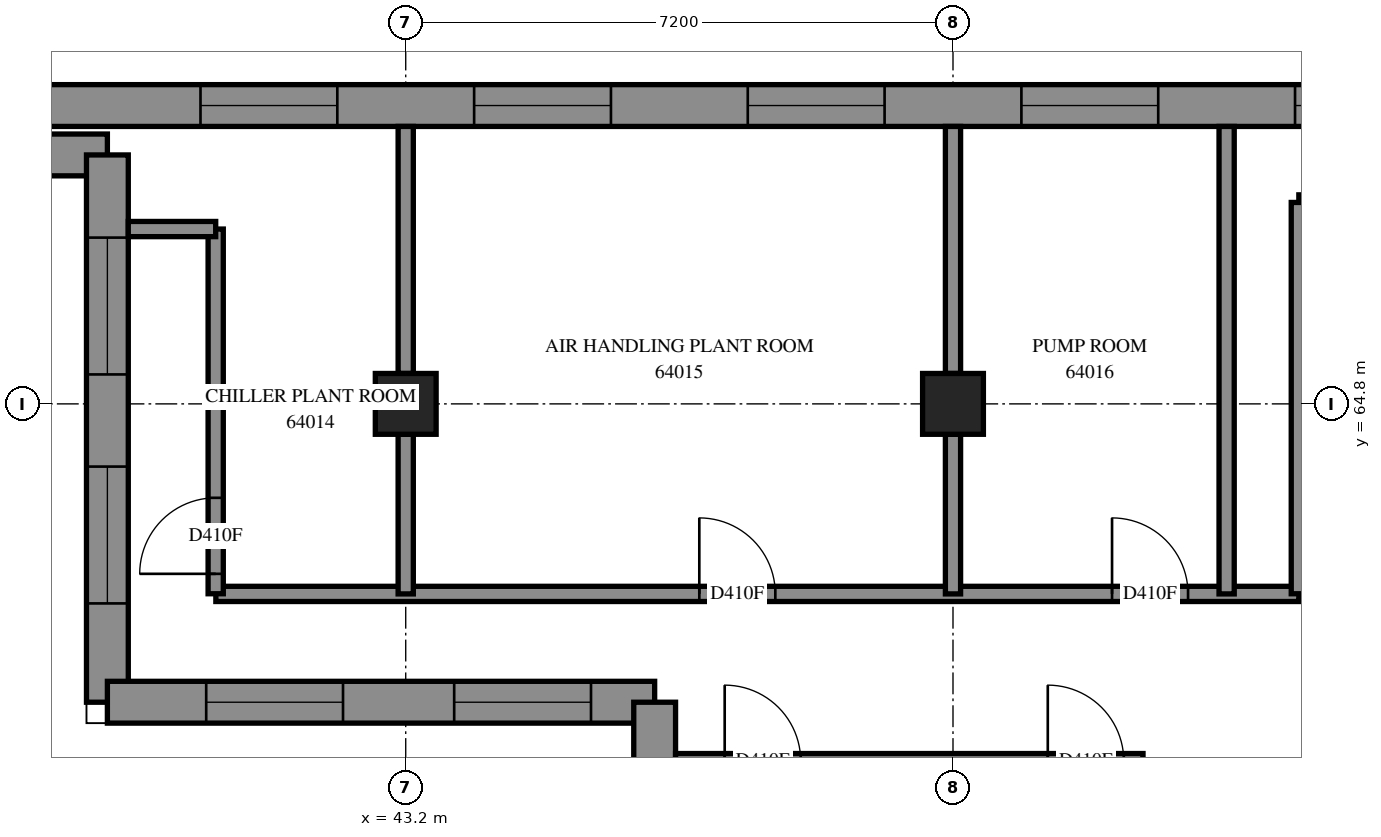
"""IFC4 building model, lengths in metres.
Left out: names, types, materials, properties, quantities, classifications, styles, units other than length and angle.
Written with IfcOpenShell. Run it as: python <this file> out.ifc"""

import sys

from ifc_helpers import new_model, si_unit, direction, frame, frame_2d, origin, origin_2d, place, context, subcontext, project, spatial, polyline, rectangle, outline, extrude, element, fill, save


model = new_model("IFC4")
c1 = context("Model", 3, precision=1e-05, world=origin(), true_north=direction((0.0, 1.0)))
c2 = subcontext(c1, "Body", "Model", "MODEL_VIEW")
j1 = project(units=[si_unit("LENGTHUNIT", "METRE"), si_unit("PLANEANGLEUNIT", "RADIAN")], contexts=[c1])
p1 = place(None, origin())
s1 = spatial("IfcSite", under=j1, at=p1, CompositionType="ELEMENT")
p2 = place(p1, origin())
s2 = spatial("IfcBuilding", under=s1, at=p2, CompositionType="ELEMENT")
p3 = place(p2, frame((0.0, 0.0, 234.6)))
s3 = spatial("IfcBuildingStorey", under=s2, at=p3, CompositionType="ELEMENT", Elevation=234.6)
for number, where, z_axis, x_axis in (
    (1, (43.2, 64.8, 0.0), (0.0, 0.0, 1.0), (1.0, 0.0, 0.0)),
    (2, (50.4, 64.8, 0.0), (0.0, 0.0, 1.0), (1.0, 0.0, 0.0)),
):
    element("IfcColumn", number, at=place(p3, frame(where, z_axis=z_axis, x_axis=x_axis)), inside=s3, PredefinedType="COLUMN", context=c2, shape_type="SweptSolid", body=[
        extrude(rectangle(XDim=0.8, YDim=0.8, at=origin_2d()), origin(), (0.0, 0.0, 1.0), 4.7),
    ])
p4 = place(p3, frame((77.844, 68.725, 0.0), z_axis=(0.0, 0.0, 1.0), x_axis=(-1.0, 0.0, 0.0)))
e3 = element("IfcWall", 3, at=p4, inside=s3, PredefinedType="SOLIDWALL", context=c2, shape_type="SweptSolid", body=[
    extrude(outline(polyline([(-0.114, -0.275), (46.044, -0.275), (45.493, 0.275), (0.114, 0.275), (-0.114, -0.275)])), origin(), (0.0, 0.0, 1.0), 4.7),
])
p5 = place(p4, frame((3.193, 0.0, 0.9)))
e4 = element("IfcOpeningElement", 4, at=p5, cuts=e3, PredefinedType="OPENING", context=c2, shape_type="SweptSolid", body=[
    extrude(rectangle(XDim=1.8, YDim=3.6, at=frame_2d((0.9, 1.8))), frame((0.0, 0.285, 0.0), z_axis=(0.0, -1.0, 0.0), x_axis=(1.0, 0.0, 0.0)), (0.0, 0.0, 1.0), 0.57),
])
p6 = place(p4, frame((6.744, 0.0, 0.9)))
e5 = element("IfcOpeningElement", 5, at=p6, cuts=e3, PredefinedType="OPENING", context=c2, shape_type="SweptSolid", body=[
    extrude(rectangle(XDim=1.8, YDim=3.6, at=frame_2d((0.9, 1.8))), frame((0.0, 0.285, 0.0), z_axis=(0.0, -1.0, 0.0), x_axis=(1.0, 0.0, 0.0)), (0.0, 0.0, 1.0), 0.57),
])
p7 = place(p4, frame((10.344, 0.0, 0.9)))
e6 = element("IfcOpeningElement", 6, at=p7, cuts=e3, PredefinedType="OPENING", context=c2, shape_type="SweptSolid", body=[
    extrude(rectangle(XDim=1.8, YDim=3.6, at=frame_2d((0.9, 1.8))), frame((0.0, 0.285, 0.0), z_axis=(0.0, -1.0, 0.0), x_axis=(1.0, 0.0, 0.0)), (0.0, 0.0, 1.0), 0.57),
])
p8 = place(p4, frame((13.944, 0.0, 0.9)))
e7 = element("IfcOpeningElement", 7, at=p8, cuts=e3, PredefinedType="OPENING", context=c2, shape_type="SweptSolid", body=[
    extrude(rectangle(XDim=1.8, YDim=3.6, at=frame_2d((0.9, 1.8))), frame((0.0, 0.285, 0.0), z_axis=(0.0, -1.0, 0.0), x_axis=(1.0, 0.0, 0.0)), (0.0, 0.0, 1.0), 0.57),
])
p9 = place(p4, frame((17.544, 0.0, 0.9)))
e8 = element("IfcOpeningElement", 8, at=p9, cuts=e3, PredefinedType="OPENING", context=c2, shape_type="SweptSolid", body=[
    extrude(rectangle(XDim=1.8, YDim=3.6, at=frame_2d((0.9, 1.8))), frame((0.0, 0.285, 0.0), z_axis=(0.0, -1.0, 0.0), x_axis=(1.0, 0.0, 0.0)), (0.0, 0.0, 1.0), 0.57),
])
p10 = place(p4, frame((21.143, 0.0, 0.9)))
e9 = element("IfcOpeningElement", 9, at=p10, cuts=e3, PredefinedType="OPENING", context=c2, shape_type="SweptSolid", body=[
    extrude(rectangle(XDim=1.8, YDim=3.6, at=frame_2d((0.9, 1.8))), frame((0.0, 0.285, 0.0), z_axis=(0.0, -1.0, 0.0), x_axis=(1.0, 0.0, 0.0)), (0.0, 0.0, 1.0), 0.57),
])
p11 = place(p4, frame((24.744, 0.0, 0.9)))
e10 = element("IfcOpeningElement", 10, at=p11, cuts=e3, PredefinedType="OPENING", context=c2, shape_type="SweptSolid", body=[
    extrude(rectangle(XDim=1.8, YDim=3.6, at=frame_2d((0.9, 1.8))), frame((0.0, 0.285, 0.0), z_axis=(0.0, -1.0, 0.0), x_axis=(1.0, 0.0, 0.0)), (0.0, 0.0, 1.0), 0.57),
])
p12 = place(p4, frame((28.343, 0.0, 0.9)))
e11 = element("IfcOpeningElement", 11, at=p12, cuts=e3, PredefinedType="OPENING", context=c2, shape_type="SweptSolid", body=[
    extrude(rectangle(XDim=1.8, YDim=3.6, at=frame_2d((0.9, 1.8))), frame((0.0, 0.285, 0.0), z_axis=(0.0, -1.0, 0.0), x_axis=(1.0, 0.0, 0.0)), (0.0, 0.0, 1.0), 0.57),
])
p13 = place(p4, frame((31.944, 0.0, 0.9)))
e12 = element("IfcOpeningElement", 12, at=p13, cuts=e3, PredefinedType="OPENING", context=c2, shape_type="SweptSolid", body=[
    extrude(rectangle(XDim=1.8, YDim=3.6, at=frame_2d((0.9, 1.8))), frame((0.0, 0.285, 0.0), z_axis=(0.0, -1.0, 0.0), x_axis=(1.0, 0.0, 0.0)), (0.0, 0.0, 1.0), 0.57),
])
p14 = place(p4, frame((35.544, 0.0, 0.9)))
e13 = element("IfcOpeningElement", 13, at=p14, cuts=e3, PredefinedType="OPENING", context=c2, shape_type="SweptSolid", body=[
    extrude(rectangle(XDim=1.8, YDim=3.6, at=frame_2d((0.9, 1.8))), frame((0.0, 0.285, 0.0), z_axis=(0.0, -1.0, 0.0), x_axis=(1.0, 0.0, 0.0)), (0.0, 0.0, 1.0), 0.57),
])
p15 = place(p3, frame((32.075, 68.075, 0.0), z_axis=(0.0, 0.0, 1.0), x_axis=(1.0, 0.0, 0.0)))
e14 = element("IfcWall", 14, at=p15, inside=s3, PredefinedType="SOLIDWALL", context=c2, shape_type="SweptSolid", body=[
    extrude(outline(polyline([(-0.275, -0.275), (6.925, -0.275), (7.475, 0.275), (0.275, 0.275), (-0.275, -0.275)])), origin(), (0.0, 0.0, 1.0), 4.7),
])
p16 = place(p3, frame((39.275, 68.075, 0.0), z_axis=(0.0, 0.0, 1.0), x_axis=(0.0, -1.0, 0.0)))
e15 = element("IfcWall", 15, at=p16, inside=s3, PredefinedType="SOLIDWALL", context=c2, shape_type="SweptSolid", body=[
    extrude(outline(polyline([(0.275, -0.275), (7.475, -0.275), (6.925, 0.275), (-0.275, 0.275), (0.275, -0.275)])), origin(), (0.0, 0.0, 1.0), 4.7),
])
p17 = place(p16, frame((1.087, 0.0, 0.9)))
e16 = element("IfcOpeningElement", 16, at=p17, cuts=e15, PredefinedType="OPENING", context=c2, shape_type="SweptSolid", body=[
    extrude(rectangle(XDim=1.8, YDim=3.6, at=frame_2d((0.9, 1.8))), frame((0.0, 0.285, 0.0), z_axis=(0.0, -1.0, 0.0), x_axis=(1.0, 0.0, 0.0)), (0.0, 0.0, 1.0), 0.57),
])
p18 = place(p16, frame((4.1, 0.0, 0.9)))
e17 = element("IfcOpeningElement", 17, at=p18, cuts=e15, PredefinedType="OPENING", context=c2, shape_type="SweptSolid", body=[
    extrude(rectangle(XDim=1.8, YDim=3.6, at=frame_2d((0.9, 1.8))), frame((0.0, 0.285, 0.0), z_axis=(0.0, -1.0, 0.0), x_axis=(1.0, 0.0, 0.0)), (0.0, 0.0, 1.0), 0.57),
])
p19 = place(p3, frame((39.275, 60.875, 0.0), z_axis=(0.0, 0.0, 1.0), x_axis=(1.0, 0.0, 0.0)))
e18 = element("IfcWall", 18, at=p19, inside=s3, PredefinedType="SOLIDWALL", context=c2, shape_type="SweptSolid", body=[
    extrude(outline(polyline([(-0.275, -0.275), (6.925, -0.275), (7.475, 0.275), (0.275, 0.275), (-0.275, -0.275)])), origin(), (0.0, 0.0, 1.0), 4.7),
])
p20 = place(p19, frame((1.3, 0.0, 0.9)))
e19 = element("IfcOpeningElement", 19, at=p20, cuts=e18, PredefinedType="OPENING", context=c2, shape_type="SweptSolid", body=[
    extrude(rectangle(XDim=1.8, YDim=3.6, at=frame_2d((0.9, 1.8))), frame((0.0, 0.285, 0.0), z_axis=(0.0, -1.0, 0.0), x_axis=(1.0, 0.0, 0.0)), (0.0, 0.0, 1.0), 0.57),
])
p21 = place(p19, frame((4.562, 0.0, 0.9)))
e20 = element("IfcOpeningElement", 20, at=p21, cuts=e18, PredefinedType="OPENING", context=c2, shape_type="SweptSolid", body=[
    extrude(rectangle(XDim=1.8, YDim=3.6, at=frame_2d((0.9, 1.8))), frame((0.0, 0.285, 0.0), z_axis=(0.0, -1.0, 0.0), x_axis=(1.0, 0.0, 0.0)), (0.0, 0.0, 1.0), 0.57),
])
p22 = place(p3, frame((46.475, 60.875, 0.0), z_axis=(0.0, 0.0, 1.0), x_axis=(0.0, -1.0, 0.0)))
e21 = element("IfcWall", 21, at=p22, inside=s3, PredefinedType="SOLIDWALL", context=c2, shape_type="SweptSolid", body=[
    extrude(outline(polyline([(0.275, -0.275), (7.475, -0.275), (6.925, 0.275), (-0.275, 0.275), (0.275, -0.275)])), origin(), (0.0, 0.0, 1.0), 4.7),
])
p23 = place(p22, frame((0.887, 0.0, 0.9)))
e22 = element("IfcOpeningElement", 22, at=p23, cuts=e21, PredefinedType="OPENING", context=c2, shape_type="SweptSolid", body=[
    extrude(rectangle(XDim=1.8, YDim=3.6, at=frame_2d((0.9, 1.8))), frame((0.0, 0.285, 0.0), z_axis=(0.0, -1.0, 0.0), x_axis=(1.0, 0.0, 0.0)), (0.0, 0.0, 1.0), 0.57),
])
p24 = place(p22, frame((4.1, 0.0, 0.9)))
e23 = element("IfcOpeningElement", 23, at=p24, cuts=e21, PredefinedType="OPENING", context=c2, shape_type="SweptSolid", body=[
    extrude(rectangle(XDim=1.8, YDim=3.6, at=frame_2d((0.9, 1.8))), frame((0.0, 0.285, 0.0), z_axis=(0.0, -1.0, 0.0), x_axis=(1.0, 0.0, 0.0)), (0.0, 0.0, 1.0), 0.57),
])
p25 = place(p3, frame((54.95, 67.45, 0.0), z_axis=(0.0, 0.0, 1.0), x_axis=(1.0, 0.0, 0.0)))
e24 = element("IfcWall", 24, at=p25, inside=s3, PredefinedType="PARTITIONING", context=c2, shape_type="SweptSolid", body=[
    extrude(rectangle(XDim=19.7, YDim=0.2, at=frame_2d((9.85, 0.0))), origin(), (0.0, 0.0, 1.0), 4.7),
])
p26 = place(p3, frame((40.702, 62.3, 0.0), z_axis=(0.0, 0.0, 1.0), x_axis=(1.0, 0.0, 0.0)))
e25 = element("IfcWall", 25, at=p26, inside=s3, PredefinedType="PARTITIONING", context=c2, shape_type="SweptSolid", body=[
    extrude(rectangle(XDim=14.248, YDim=0.2, at=frame_2d((7.124, 0.0))), origin(), (0.0, 0.0, 1.0), 4.7),
])
p27 = place(p26, frame((6.361, 0.0, 0.0)))
e26 = element("IfcOpeningElement", 26, at=p27, cuts=e25, PredefinedType="OPENING", context=c2, shape_type="SweptSolid", body=[
    extrude(rectangle(XDim=1.0, YDim=2.1, at=frame_2d((0.5, 1.05))), frame((0.0, 0.11, 0.0), z_axis=(0.0, -1.0, 0.0), x_axis=(1.0, 0.0, 0.0)), (0.0, 0.0, 1.0), 0.22),
])
p28 = place(p26, frame((11.79, 0.0, 0.0)))
e27 = element("IfcOpeningElement", 27, at=p28, cuts=e25, PredefinedType="OPENING", context=c2, shape_type="SweptSolid", body=[
    extrude(rectangle(XDim=1.0, YDim=2.1, at=frame_2d((0.5, 1.05))), frame((0.0, 0.11, 0.0), z_axis=(0.0, -1.0, 0.0), x_axis=(1.0, 0.0, 0.0)), (0.0, 0.0, 1.0), 0.22),
])
p29 = place(p3, frame((46.75, 60.1, 0.0), z_axis=(0.0, 0.0, 1.0), x_axis=(1.0, 0.0, 0.0)))
e28 = element("IfcWall", 28, at=p29, inside=s3, PredefinedType="PARTITIONING", context=c2, shape_type="SweptSolid", body=[
    extrude(rectangle(XDim=6.15, YDim=0.2, at=frame_2d((3.075, 0.0))), origin(), (0.0, 0.0, 1.0), 4.7),
])
p30 = place(p29, frame((0.646, 0.0, 0.0)))
e29 = element("IfcOpeningElement", 29, at=p30, cuts=e28, PredefinedType="OPENING", context=c2, shape_type="SweptSolid", body=[
    extrude(rectangle(XDim=1.0, YDim=2.1, at=frame_2d((0.5, 1.05))), frame((0.0, 0.11, 0.0), z_axis=(0.0, -1.0, 0.0), x_axis=(1.0, 0.0, 0.0)), (0.0, 0.0, 1.0), 0.22),
])
p31 = place(p29, frame((4.897, 0.0, 0.0)))
e30 = element("IfcOpeningElement", 30, at=p31, cuts=e28, PredefinedType="OPENING", context=c2, shape_type="SweptSolid", body=[
    extrude(rectangle(XDim=1.0, YDim=2.1, at=frame_2d((0.5, 1.05))), frame((0.0, 0.11, 0.0), z_axis=(0.0, -1.0, 0.0), x_axis=(1.0, 0.0, 0.0)), (0.0, 0.0, 1.0), 0.22),
])
p32 = place(p3, frame((54.0, 62.3, 0.0), z_axis=(0.0, 0.0, 1.0), x_axis=(0.0, 1.0, 0.0)))
e31 = element("IfcWall", 31, at=p32, inside=s3, PredefinedType="PARTITIONING", context=c2, shape_type="SweptSolid", body=[
    extrude(rectangle(XDim=6.15, YDim=0.2, at=frame_2d((3.075, 0.0))), origin(), (0.0, 0.0, 1.0), 4.7),
])
p33 = place(p3, frame((54.95, 62.302, 0.0), z_axis=(0.0, 0.0, 1.0), x_axis=(0.0, 1.0, 0.0)))
e32 = element("IfcWall", 32, at=p33, inside=s3, PredefinedType="PARTITIONING", context=c2, shape_type="SweptSolid", body=[
    extrude(rectangle(XDim=5.148, YDim=0.2, at=frame_2d((2.574, 0.0))), origin(), (0.0, 0.0, 1.0), 4.7),
])
p34 = place(p3, frame((40.7, 62.302, 0.0), z_axis=(0.0, 0.0, 1.0), x_axis=(0.0, 1.0, 0.0)))
e33 = element("IfcWall", 33, at=p34, inside=s3, PredefinedType="PARTITIONING", context=c2, shape_type="SweptSolid", body=[
    extrude(rectangle(XDim=4.798, YDim=0.2, at=frame_2d((2.399, 0.0))), origin(), (0.0, 0.0, 1.0), 4.7),
])
p35 = place(p34, frame((0.262, 0.0, 0.0)))
e34 = element("IfcOpeningElement", 34, at=p35, cuts=e33, PredefinedType="OPENING", context=c2, shape_type="SweptSolid", body=[
    extrude(rectangle(XDim=1.0, YDim=2.1, at=frame_2d((0.5, 1.05))), frame((0.0, 0.11, 0.0), z_axis=(0.0, -1.0, 0.0), x_axis=(1.0, 0.0, 0.0)), (0.0, 0.0, 1.0), 0.22),
])
for number, where, z_axis, x_axis in (
    (35, (43.2, 65.2, 0.0), (0.0, 0.0, 1.0), (0.0, 1.0, 0.0)),
    (36, (50.4, 65.2, 0.0), (0.0, 0.0, 1.0), (0.0, 1.0, 0.0)),
):
    element("IfcWall", number, at=place(p3, frame(where, z_axis=z_axis, x_axis=x_axis)), inside=s3, PredefinedType="PARTITIONING", context=c2, shape_type="SweptSolid", body=[
        extrude(rectangle(XDim=3.25, YDim=0.2, at=frame_2d((1.625, 0.0))), origin(), (0.0, 0.0, 1.0), 4.7),
    ])
for number, where, z_axis, x_axis in (
    (37, (43.2, 62.3, 0.0), (0.0, 0.0, 1.0), (0.0, 1.0, 0.0)),
    (38, (50.4, 62.3, 0.0), (0.0, 0.0, 1.0), (0.0, 1.0, 0.0)),
):
    element("IfcWall", number, at=place(p3, frame(where, z_axis=z_axis, x_axis=x_axis)), inside=s3, PredefinedType="PARTITIONING", context=c2, shape_type="SweptSolid", body=[
        extrude(rectangle(XDim=2.1, YDim=0.2, at=frame_2d((1.05, 0.0))), origin(), (0.0, 0.0, 1.0), 4.7),
    ])
p36 = place(p3, frame((39.55, 67.1, 0.0), z_axis=(0.0, 0.0, 1.0), x_axis=(1.0, 0.0, 0.0)))
e39 = element("IfcWall", 39, at=p36, inside=s3, PredefinedType="PARTITIONING", context=c2, shape_type="SweptSolid", body=[
    extrude(rectangle(XDim=1.15, YDim=0.2, at=frame_2d((0.575, 0.0))), origin(), (0.0, 0.0, 1.0), 4.7),
])
p37 = place(p10, origin())
e40 = element("IfcWindow", 40, at=p37, inside=s3, PartitioningType="SINGLE_PANEL", PredefinedType="WINDOW", context=c2, shape_type="SweptSolid", body=[
    extrude(rectangle(XDim=1.8, YDim=3.6, at=frame_2d((0.9, 1.8))), frame((0.0, 0.155, 0.0), z_axis=(0.0, -1.0, 0.0), x_axis=(1.0, 0.0, 0.0)), (0.0, 0.0, 1.0), 0.06),
])
fill(e9, e40)
p38 = place(p11, origin())
e41 = element("IfcWindow", 41, at=p38, inside=s3, PartitioningType="SINGLE_PANEL", PredefinedType="WINDOW", context=c2, shape_type="SweptSolid", body=[
    extrude(rectangle(XDim=1.8, YDim=3.6, at=frame_2d((0.9, 1.8))), frame((0.0, 0.155, 0.0), z_axis=(0.0, -1.0, 0.0), x_axis=(1.0, 0.0, 0.0)), (0.0, 0.0, 1.0), 0.06),
])
fill(e10, e41)
p39 = place(p12, origin())
e42 = element("IfcWindow", 42, at=p39, inside=s3, PartitioningType="SINGLE_PANEL", PredefinedType="WINDOW", context=c2, shape_type="SweptSolid", body=[
    extrude(rectangle(XDim=1.8, YDim=3.6, at=frame_2d((0.9, 1.8))), frame((0.0, 0.155, 0.0), z_axis=(0.0, -1.0, 0.0), x_axis=(1.0, 0.0, 0.0)), (0.0, 0.0, 1.0), 0.06),
])
fill(e11, e42)
p40 = place(p13, origin())
e43 = element("IfcWindow", 43, at=p40, inside=s3, PartitioningType="SINGLE_PANEL", PredefinedType="WINDOW", context=c2, shape_type="SweptSolid", body=[
    extrude(rectangle(XDim=1.8, YDim=3.6, at=frame_2d((0.9, 1.8))), frame((0.0, 0.155, 0.0), z_axis=(0.0, -1.0, 0.0), x_axis=(1.0, 0.0, 0.0)), (0.0, 0.0, 1.0), 0.06),
])
fill(e12, e43)
p41 = place(p14, origin())
e44 = element("IfcWindow", 44, at=p41, inside=s3, PartitioningType="SINGLE_PANEL", PredefinedType="WINDOW", context=c2, shape_type="SweptSolid", body=[
    extrude(rectangle(XDim=1.8, YDim=3.6, at=frame_2d((0.9, 1.8))), frame((0.0, 0.155, 0.0), z_axis=(0.0, -1.0, 0.0), x_axis=(1.0, 0.0, 0.0)), (0.0, 0.0, 1.0), 0.06),
])
fill(e13, e44)
p42 = place(p17, origin())
e45 = element("IfcWindow", 45, at=p42, inside=s3, PartitioningType="SINGLE_PANEL", PredefinedType="WINDOW", context=c2, shape_type="SweptSolid", body=[
    extrude(rectangle(XDim=1.8, YDim=3.6, at=frame_2d((0.9, 1.8))), frame((0.0, 0.155, 0.0), z_axis=(0.0, -1.0, 0.0), x_axis=(1.0, 0.0, 0.0)), (0.0, 0.0, 1.0), 0.06),
])
fill(e16, e45)
p43 = place(p18, origin())
e46 = element("IfcWindow", 46, at=p43, inside=s3, PartitioningType="SINGLE_PANEL", PredefinedType="WINDOW", context=c2, shape_type="SweptSolid", body=[
    extrude(rectangle(XDim=1.8, YDim=3.6, at=frame_2d((0.9, 1.8))), frame((0.0, 0.155, 0.0), z_axis=(0.0, -1.0, 0.0), x_axis=(1.0, 0.0, 0.0)), (0.0, 0.0, 1.0), 0.06),
])
fill(e17, e46)
p44 = place(p20, origin())
e47 = element("IfcWindow", 47, at=p44, inside=s3, PartitioningType="SINGLE_PANEL", PredefinedType="WINDOW", context=c2, shape_type="SweptSolid", body=[
    extrude(rectangle(XDim=1.8, YDim=3.6, at=frame_2d((0.9, 1.8))), frame((0.0, 0.155, 0.0), z_axis=(0.0, -1.0, 0.0), x_axis=(1.0, 0.0, 0.0)), (0.0, 0.0, 1.0), 0.06),
])
fill(e19, e47)
p45 = place(p21, origin())
e48 = element("IfcWindow", 48, at=p45, inside=s3, PartitioningType="SINGLE_PANEL", PredefinedType="WINDOW", context=c2, shape_type="SweptSolid", body=[
    extrude(rectangle(XDim=1.8, YDim=3.6, at=frame_2d((0.9, 1.8))), frame((0.0, 0.155, 0.0), z_axis=(0.0, -1.0, 0.0), x_axis=(1.0, 0.0, 0.0)), (0.0, 0.0, 1.0), 0.06),
])
fill(e20, e48)
p46 = place(p35, origin())
e49 = element("IfcDoor", 49, at=p46, inside=s3, OperationType="SINGLE_SWING_LEFT", PredefinedType="DOOR", context=c2, shape_type="SweptSolid", body=[
    extrude(rectangle(XDim=1.0, YDim=2.1, at=frame_2d((0.5, 1.05))), frame((0.0, 0.025, 0.0), z_axis=(0.0, -1.0, 0.0), x_axis=(1.0, 0.0, 0.0)), (0.0, 0.0, 1.0), 0.05),
])
fill(e34, e49)
p47 = place(p27, origin())
e50 = element("IfcDoor", 50, at=p47, inside=s3, OperationType="SINGLE_SWING_RIGHT", PredefinedType="DOOR", context=c2, shape_type="SweptSolid", body=[
    extrude(rectangle(XDim=1.0, YDim=2.1, at=frame_2d((0.5, 1.05))), frame((0.0, 0.025, 0.0), z_axis=(0.0, -1.0, 0.0), x_axis=(1.0, 0.0, 0.0)), (0.0, 0.0, 1.0), 0.05),
])
fill(e26, e50)
p48 = place(p28, origin())
e51 = element("IfcDoor", 51, at=p48, inside=s3, OperationType="SINGLE_SWING_RIGHT", PredefinedType="DOOR", context=c2, shape_type="SweptSolid", body=[
    extrude(rectangle(XDim=1.0, YDim=2.1, at=frame_2d((0.5, 1.05))), frame((0.0, 0.025, 0.0), z_axis=(0.0, -1.0, 0.0), x_axis=(1.0, 0.0, 0.0)), (0.0, 0.0, 1.0), 0.05),
])
fill(e27, e51)
save(model, sys.argv[1])
